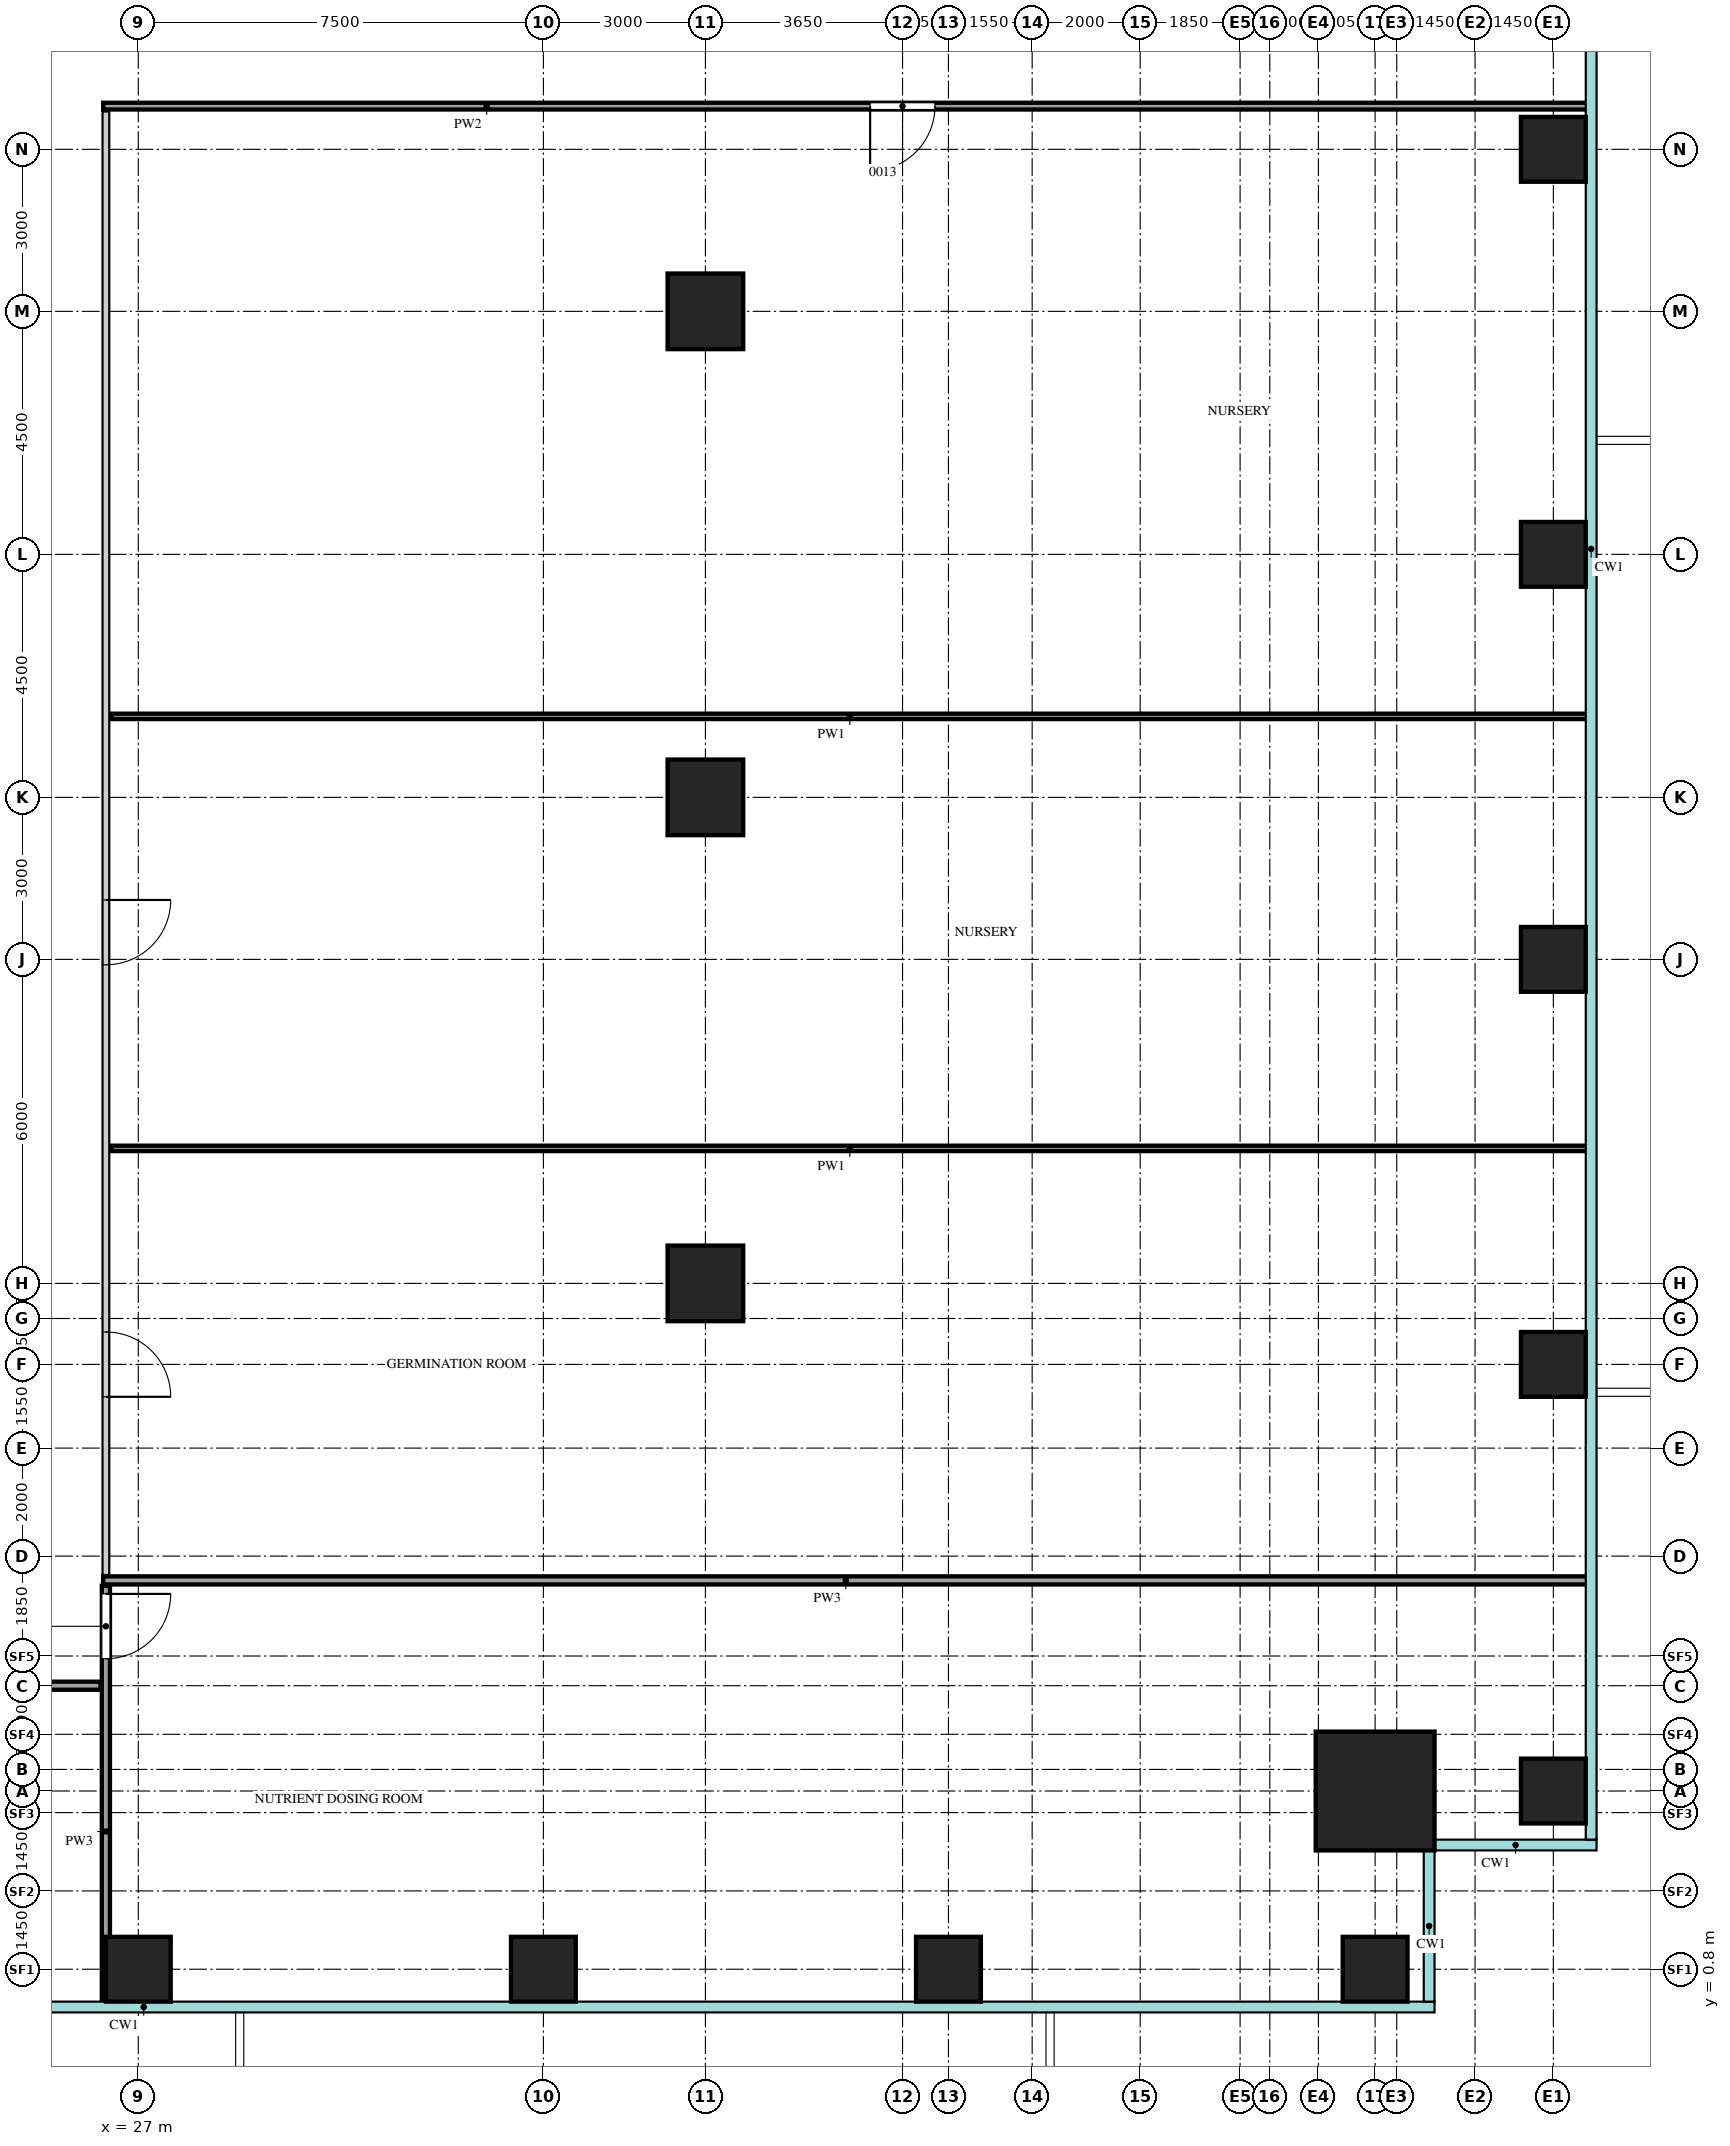
"""IFC4 building model, lengths in metres.
Left out: names, types, materials, properties, quantities, classifications, styles, units other than length and angle.
Written with IfcOpenShell. Run it as: python <this file> out.ifc"""

import sys

from ifc_helpers import new_model, si_unit, direction, frame, frame_2d, origin, origin_2d, place, context, subcontext, project, spatial, rectangle, extrude, source, transform, mapped, element, fill, save


model = new_model("IFC4")
c1 = context("Model", 3, precision=1e-05, world=origin(), true_north=direction((0.0, 1.0)))
c2 = subcontext(c1, "Body", "Model", "MODEL_VIEW")
j1 = project(units=[si_unit("LENGTHUNIT", "METRE"), si_unit("PLANEANGLEUNIT", "RADIAN")], contexts=[c1])
p1 = place(None, origin())
s1 = spatial("IfcSite", under=j1, at=p1, CompositionType="ELEMENT")
p2 = place(p1, origin())
s2 = spatial("IfcBuilding", under=s1, at=p2, CompositionType="ELEMENT")
p3 = place(p2, frame((0.0, 0.0, 51.0)))
s3 = spatial("IfcBuildingStorey", under=s2, at=p3, CompositionType="ELEMENT", Elevation=51.0)
m1 = source(origin(), c2, "Body", "SweptSolid", [
    extrude(rectangle(XDim=2.2, YDim=2.2, at=origin_2d()), origin(), (0.0, 0.0, 1.0), 4.5),
])
p4 = place(p3, frame((49.9, 4.1, 0.0), z_axis=(0.0, 0.0, 1.0), x_axis=(1.0, 0.0, 0.0)))
e1 = element("IfcColumn", 1, at=p4, inside=s3, PredefinedType="COLUMN", context=c2, shape_type="MappedRepresentation", body=[
    mapped(m1, transform((0.0, 0.0, 0.0))),
])
m2 = source(origin(), c2, "Body", "SweptSolid", [
    extrude(rectangle(XDim=1.2, YDim=1.2, at=origin_2d()), origin(), (0.0, 0.0, 1.0), 4.2),
])
for number, where, z_axis, x_axis in (
    (2, (27.0, 0.8, 0.0), (0.0, 0.0, 1.0), (1.0, 0.0, 0.0)),
    (3, (34.5, 0.8, 0.0), (0.0, 0.0, 1.0), (1.0, 0.0, 0.0)),
    (4, (42.0, 0.8, 0.0), (0.0, 0.0, 1.0), (1.0, 0.0, 0.0)),
    (5, (49.9, 0.8, 0.0), (0.0, 0.0, 1.0), (1.0, 0.0, 0.0)),
    (6, (53.2, 4.1, 0.0), (0.0, 0.0, 1.0), (1.0, 0.0, 0.0)),
    (7, (53.2, 12.0, 0.0), (0.0, 0.0, 1.0), (1.0, 0.0, 0.0)),
    (8, (53.2, 19.5, 0.0), (0.0, 0.0, 1.0), (1.0, 0.0, 0.0)),
    (9, (53.2, 27.0, 0.0), (0.0, 0.0, 1.0), (1.0, 0.0, 0.0)),
    (10, (53.2, 34.5, 0.0), (0.0, 0.0, 1.0), (1.0, 0.0, 0.0)),
):
    element("IfcColumn", number, at=place(p3, frame(where, z_axis=z_axis, x_axis=x_axis)), inside=s3, PredefinedType="COLUMN", context=c2, shape_type="MappedRepresentation", body=[
        mapped(m2, transform((0.0, 0.0, 0.0))),
    ])
m3 = source(origin(), c2, "Body", "SweptSolid", [
    extrude(rectangle(XDim=1.4, YDim=1.4, at=origin_2d()), origin(), (0.0, 0.0, 1.0), 4.2),
])
for number, where, z_axis, x_axis in (
    (11, (37.5, 13.5, 0.0), (0.0, 0.0, 1.0), (1.0, 0.0, 0.0)),
    (12, (37.5, 22.5, 0.0), (0.0, 0.0, 1.0), (1.0, 0.0, 0.0)),
    (13, (37.5, 31.5, 0.0), (0.0, 0.0, 1.0), (1.0, 0.0, 0.0)),
):
    element("IfcColumn", number, at=place(p3, frame(where, z_axis=z_axis, x_axis=x_axis)), inside=s3, PredefinedType="COLUMN", context=c2, shape_type="MappedRepresentation", body=[
        mapped(m3, transform((0.0, 0.0, 0.0))),
    ])
m4 = source(origin(), c2, "Body", "SweptSolid", [
    extrude(rectangle(XDim=7.75, YDim=0.15, at=frame_2d((3.875, 0.0))), origin(), (0.0, 0.0, 1.0), 4.3),
])
p5 = place(p3, frame((26.4, 0.15, 0.0), z_axis=(0.0, 0.0, 1.0), x_axis=(0.0, 1.0, 0.0)))
e14 = element("IfcWall", 14, at=p5, inside=s3, PredefinedType="PARTITIONING", context=c2, shape_type="MappedRepresentation", body=[
    mapped(m4, transform((0.0, 0.0, 0.0))),
])
m5 = source(origin(), c2, "Body", "SweptSolid", [
    extrude(rectangle(XDim=1.2, YDim=2.1, at=frame_2d((0.6, 1.05))), frame((0.0, 0.085, 0.0), z_axis=(0.0, -1.0, 0.0), x_axis=(1.0, 0.0, 0.0)), (0.0, 0.0, 1.0), 0.17),
])
p6 = place(p5, frame((6.4, 0.0, 0.0)))
e15 = element("IfcOpeningElement", 15, at=p6, cuts=e14, PredefinedType="OPENING", context=c2, shape_type="MappedRepresentation", body=[
    mapped(m5, transform((0.0, 0.0, 0.0))),
])
m6 = source(origin(), c2, "Body", "SweptSolid", [
    extrude(rectangle(XDim=22.15, YDim=0.15, at=frame_2d((11.075, 0.0))), origin(), (0.0, 0.0, 1.0), 4.3),
])
p7 = place(p3, frame((4.15, 6.05, 0.0), z_axis=(0.0, 0.0, 1.0), x_axis=(1.0, 0.0, 0.0)))
e16 = element("IfcWall", 16, at=p7, inside=s3, PredefinedType="PARTITIONING", context=c2, shape_type="MappedRepresentation", body=[
    mapped(m6, transform((0.0, 0.0, 0.0))),
])
p8 = place(p7, frame((9.2, 0.0, 0.0)))
e17 = element("IfcOpeningElement", 17, at=p8, cuts=e16, PredefinedType="OPENING", context=c2, shape_type="MappedRepresentation", body=[
    mapped(m5, transform((0.0, 0.0, 0.0))),
])
m7 = source(origin(), c2, "Body", "SweptSolid", [
    extrude(rectangle(XDim=27.5, YDim=0.15, at=frame_2d((13.75, 0.0))), origin(), (0.0, 0.0, 1.0), 4.3),
])
p9 = place(p3, frame((26.35, 8.0, 0.0), z_axis=(0.0, 0.0, 1.0), x_axis=(1.0, 0.0, 0.0)))
e18 = element("IfcWall", 18, at=p9, inside=s3, PredefinedType="PARTITIONING", context=c2, shape_type="MappedRepresentation", body=[
    mapped(m7, transform((0.0, 0.0, 0.0))),
])
m8 = source(origin(), c2, "Body", "SweptSolid", [
    extrude(rectangle(XDim=27.1, YDim=0.125, at=frame_2d((13.55, 0.0))), origin(), (0.0, 0.0, 1.0), 4.3),
])
p10 = place(p3, frame((26.4, 8.1, 0.0), z_axis=(0.0, 0.0, 1.0), x_axis=(0.0, 1.0, 0.0)))
e19 = element("IfcWall", 19, at=p10, inside=s3, PredefinedType="PARTITIONING", context=c2, shape_type="MappedRepresentation", body=[
    mapped(m8, transform((0.0, 0.0, 0.0))),
])
m9 = source(origin(), c2, "Body", "SweptSolid", [
    extrude(rectangle(XDim=1.2, YDim=2.1, at=frame_2d((0.6, 1.05))), frame((0.0, 0.073, 0.0), z_axis=(0.0, -1.0, 0.0), x_axis=(1.0, 0.0, 0.0)), (0.0, 0.0, 1.0), 0.145),
])
p11 = place(p10, frame((3.3, 0.0, 0.0)))
e20 = element("IfcOpeningElement", 20, at=p11, cuts=e19, PredefinedType="OPENING", context=c2, shape_type="MappedRepresentation", body=[
    mapped(m9, transform((0.0, 0.0, 0.0))),
])
p12 = place(p10, frame((11.3, 0.0, 0.0)))
e21 = element("IfcOpeningElement", 21, at=p12, cuts=e19, PredefinedType="OPENING", context=c2, shape_type="MappedRepresentation", body=[
    mapped(m9, transform((0.0, 0.0, 0.0))),
])
m10 = source(origin(), c2, "Body", "SweptSolid", [
    extrude(rectangle(XDim=27.35, YDim=0.1, at=frame_2d((13.675, 0.0))), origin(), (0.0, 0.0, 1.0), 4.3),
])
for number, where, z_axis, x_axis in (
    (22, (26.5, 16.0, 0.0), (0.0, 0.0, 1.0), (1.0, 0.0, 0.0)),
    (23, (26.5, 24.0, 0.0), (0.0, 0.0, 1.0), (1.0, 0.0, 0.0)),
):
    element("IfcWall", number, at=place(p3, frame(where, z_axis=z_axis, x_axis=x_axis)), inside=s3, PredefinedType="PARTITIONING", context=c2, shape_type="MappedRepresentation", body=[
        mapped(m10, transform((0.0, 0.0, 0.0))),
    ])
m11 = source(origin(), c2, "Body", "SweptSolid", [
    extrude(rectangle(XDim=27.5, YDim=0.125, at=frame_2d((13.75, 0.0))), origin(), (0.0, 0.0, 1.0), 4.3),
])
p13 = place(p3, frame((26.35, 35.3, 0.0), z_axis=(0.0, 0.0, 1.0), x_axis=(1.0, 0.0, 0.0)))
e24 = element("IfcWall", 24, at=p13, inside=s3, PredefinedType="PARTITIONING", context=c2, shape_type="MappedRepresentation", body=[
    mapped(m11, transform((0.0, 0.0, 0.0))),
])
p14 = place(p13, frame((14.2, 0.0, 0.0)))
e25 = element("IfcOpeningElement", 25, at=p14, cuts=e24, PredefinedType="OPENING", context=c2, shape_type="MappedRepresentation", body=[
    mapped(m9, transform((0.0, 0.0, 0.0))),
])
m12 = source(origin(), c2, "Body", "SweptSolid", [
    extrude(rectangle(XDim=1.2, YDim=2.1, at=frame_2d((0.6, 1.05))), frame((0.0, 0.025, 0.0), z_axis=(0.0, -1.0, 0.0), x_axis=(1.0, 0.0, 0.0)), (0.0, 0.0, 1.0), 0.05),
])
p15 = place(p6, origin())
e26 = element("IfcDoor", 26, at=p15, inside=s3, OperationType="SINGLE_SWING_RIGHT", PredefinedType="DOOR", context=c2, shape_type="MappedRepresentation", body=[
    mapped(m12, transform((0.0, 0.0, 0.0))),
])
fill(e15, e26)
p16 = place(p11, origin())
e27 = element("IfcDoor", 27, at=p16, inside=s3, OperationType="SINGLE_SWING_LEFT", PredefinedType="DOOR", context=c2, shape_type="MappedRepresentation", body=[
    mapped(m12, transform((0.0, 0.0, 0.0))),
])
fill(e20, e27)
p17 = place(p12, origin())
e28 = element("IfcDoor", 28, at=p17, inside=s3, OperationType="SINGLE_SWING_RIGHT", PredefinedType="DOOR", context=c2, shape_type="MappedRepresentation", body=[
    mapped(m12, transform((0.0, 0.0, 0.0))),
])
fill(e21, e28)
p18 = place(p14, origin())
e29 = element("IfcDoor", 29, at=p18, inside=s3, OperationType="SINGLE_SWING_LEFT", PredefinedType="DOOR", context=c2, shape_type="MappedRepresentation", body=[
    mapped(m12, transform((0.0, 0.0, 0.0))),
])
fill(e25, e29)
save(model, sys.argv[1])
